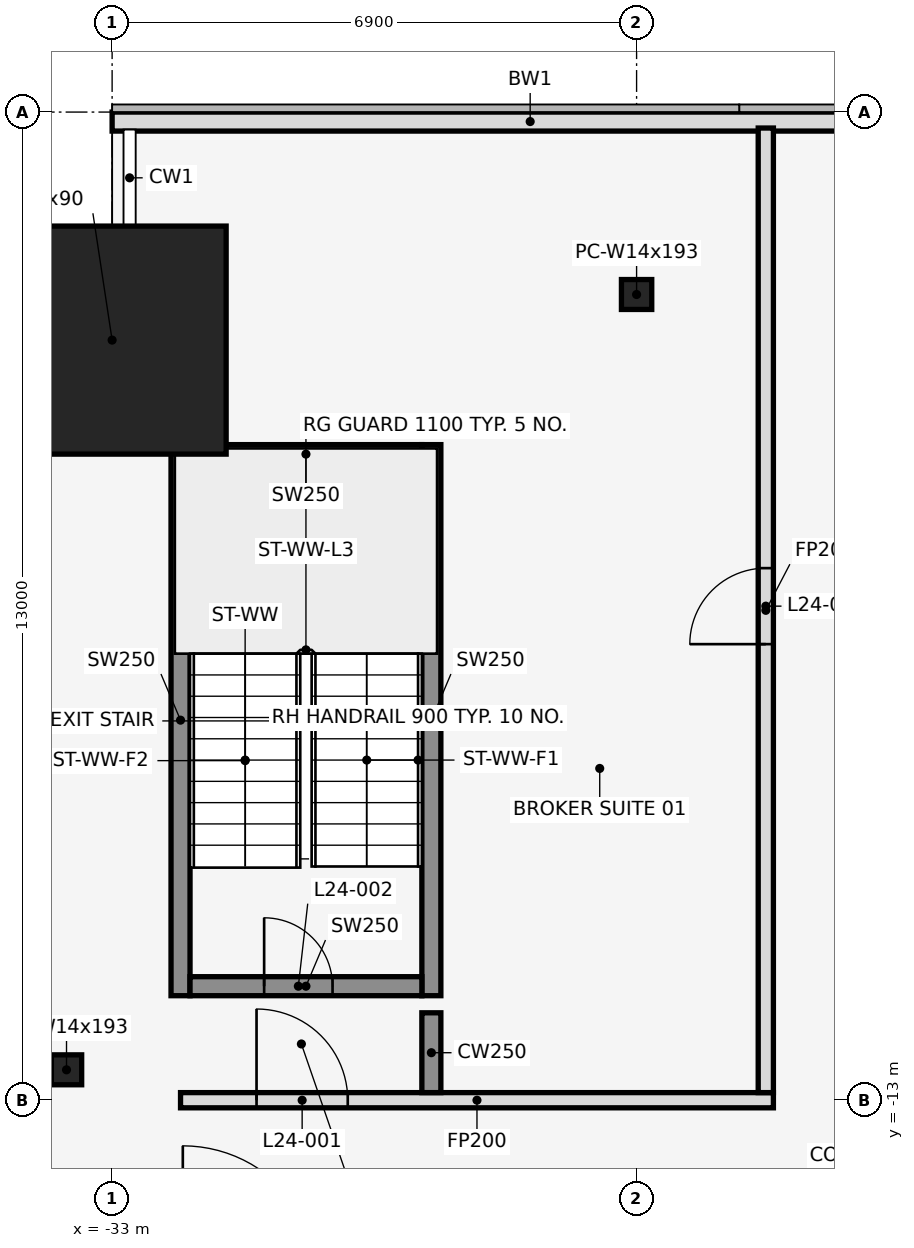
"""IFC4 building model, lengths in metres.
Left out: names, types, materials, properties, quantities, classifications, styles, units other than length and angle.
Written with IfcOpenShell. Run it as: python <this file> out.ifc"""

import sys

from ifc_helpers import new_model, si_unit, direction, frame, frame_2d, origin, origin_2d, place, context, subcontext, project, spatial, rectangle, hollow_rectangle, i_section, extrude, element, fill, save


model = new_model("IFC4")
c1 = context("Model", 3, precision=1e-05, world=origin(), true_north=direction((0.0, 1.0)))
c2 = subcontext(c1, "Body", "Model", "MODEL_VIEW")
j1 = project(units=[si_unit("LENGTHUNIT", "METRE"), si_unit("PLANEANGLEUNIT", "RADIAN")], contexts=[c1])
p1 = place(None, origin())
s1 = spatial("IfcSite", under=j1, at=p1, CompositionType="ELEMENT")
p2 = place(p1, origin())
s2 = spatial("IfcBuilding", under=s1, at=p2, CompositionType="ELEMENT")
p3 = place(p2, frame((0.0, 0.0, 114.5)))
s3 = spatial("IfcBuildingStorey", under=s2, at=p3, CompositionType="ELEMENT", Elevation=114.5)
p4 = place(p3, frame((-33.0, -3.0, 0.0), z_axis=(0.0, 0.0, 1.0), x_axis=(1.0, 0.0, 0.0)))
e1 = element("IfcColumn", 1, at=p4, inside=s3, PredefinedType="COLUMN", context=c2, shape_type="SweptSolid", body=[
    extrude(hollow_rectangle(XDim=3.0, YDim=3.0, WallThickness=0.09, at=origin_2d()), origin(), (0.0, 0.0, 1.0), 4.1),
])
for number, where, z_axis, x_axis in (
    (2, (-26.1, -2.4, 0.0), (0.0, 0.0, 1.0), (1.0, 0.0, 0.0)),
    (3, (-33.6, -12.6, 0.0), (0.0, 0.0, 1.0), (1.0, 0.0, 0.0)),
):
    element("IfcColumn", number, at=place(p3, frame(where, z_axis=z_axis, x_axis=x_axis)), inside=s3, PredefinedType="COLUMN", context=c2, shape_type="SweptSolid", body=[
        extrude(i_section(OverallWidth=0.399, OverallDepth=0.394, WebThickness=0.023, FlangeThickness=0.037, at=origin_2d()), origin(), (0.0, 0.0, 1.0), 4.1),
    ])
p5 = place(p3, frame((-22.0, -0.125, 0.0), z_axis=(0.0, 0.0, 1.0), x_axis=(-1.0, 0.0, 0.0)))
e4 = element("IfcWall", 4, at=p5, inside=s3, PredefinedType="STANDARD", context=c2, shape_type="SweptSolid", body=[
    extrude(rectangle(XDim=11.0, YDim=0.25, at=frame_2d((5.5, 0.0))), origin(), (0.0, 0.0, 1.0), 3.95),
])
for number, where, z_axis, x_axis in (
    (5, (-32.1, -11.625, 0.0), (0.0, 0.0, 1.0), (0.0, 1.0, 0.0)),
    (6, (-28.8, -11.625, 0.0), (0.0, 0.0, 1.0), (0.0, 1.0, 0.0)),
):
    element("IfcWall", number, at=place(p3, frame(where, z_axis=z_axis, x_axis=x_axis)), inside=s3, PredefinedType="SHEAR", context=c2, shape_type="SweptSolid", body=[
        extrude(rectangle(XDim=7.25, YDim=0.25, at=frame_2d((3.625, 0.0))), origin(), (0.0, 0.0, 1.0), 4.1),
    ])
p6 = place(p3, frame((-31.975, -11.5, 0.0), z_axis=(0.0, 0.0, 1.0), x_axis=(1.0, 0.0, 0.0)))
e7 = element("IfcWall", 7, at=p6, inside=s3, PredefinedType="SHEAR", context=c2, shape_type="SweptSolid", body=[
    extrude(rectangle(XDim=3.05, YDim=0.25, at=frame_2d((1.525, 0.0))), origin(), (0.0, 0.0, 1.0), 4.1),
])
p7 = place(p6, frame((0.975, 0.0, 0.0)))
e8 = element("IfcOpeningElement", 8, at=p7, cuts=e7, PredefinedType="OPENING", context=c2, shape_type="SweptSolid", body=[
    extrude(rectangle(XDim=0.9, YDim=2.1, at=frame_2d((0.45, 1.05))), frame((0.0, 0.137, 0.0), z_axis=(0.0, -1.0, 0.0), x_axis=(1.0, 0.0, 0.0)), (0.0, 0.0, 1.0), 0.274),
])
p8 = place(p3, frame((-31.975, -4.5, 0.0), z_axis=(0.0, 0.0, 1.0), x_axis=(1.0, 0.0, 0.0)))
e9 = element("IfcWall", 9, at=p8, inside=s3, PredefinedType="SHEAR", context=c2, shape_type="SweptSolid", body=[
    extrude(rectangle(XDim=3.05, YDim=0.25, at=frame_2d((1.525, 0.0))), origin(), (0.0, 0.0, 1.0), 4.1),
])
p9 = place(p3, frame((-32.1, -13.0, 0.0), z_axis=(0.0, 0.0, 1.0), x_axis=(1.0, 0.0, 0.0)))
e10 = element("IfcWall", 10, at=p9, inside=s3, PredefinedType="PARTITIONING", context=c2, shape_type="SweptSolid", body=[
    extrude(rectangle(XDim=7.8, YDim=0.2, at=frame_2d((3.9, 0.0))), origin(), (0.0, 0.0, 1.0), 3.018),
])
p10 = place(p9, frame((1.0, 0.0, 0.0)))
e11 = element("IfcOpeningElement", 11, at=p10, cuts=e10, PredefinedType="OPENING", context=c2, shape_type="SweptSolid", body=[
    extrude(rectangle(XDim=1.2, YDim=2.1, at=frame_2d((0.6, 1.05))), frame((0.0, 0.112, 0.0), z_axis=(0.0, -1.0, 0.0), x_axis=(1.0, 0.0, 0.0)), (0.0, 0.0, 1.0), 0.224),
])
p11 = place(p3, frame((-28.8, -12.9, 0.0), z_axis=(0.0, 0.0, 1.0), x_axis=(0.0, 1.0, 0.0)))
e12 = element("IfcWall", 12, at=p11, inside=s3, PredefinedType="SHEAR", context=c2, shape_type="SweptSolid", body=[
    extrude(rectangle(XDim=1.05, YDim=0.25, at=frame_2d((0.525, 0.0))), origin(), (0.0, 0.0, 1.0), 4.1),
])
p12 = place(p3, frame((-24.4, -12.9, 0.0), z_axis=(0.0, 0.0, 1.0), x_axis=(0.0, 1.0, 0.0)))
e13 = element("IfcWall", 13, at=p12, inside=s3, PredefinedType="PARTITIONING", context=c2, shape_type="SweptSolid", body=[
    extrude(rectangle(XDim=12.69, YDim=0.2, at=frame_2d((6.345, 0.0))), origin(), (0.0, 0.0, 1.0), 3.018),
])
p13 = place(p12, frame((5.9, 0.0, 0.0)))
e14 = element("IfcOpeningElement", 14, at=p13, cuts=e13, PredefinedType="OPENING", context=c2, shape_type="SweptSolid", body=[
    extrude(rectangle(XDim=1.0, YDim=2.1, at=frame_2d((0.5, 1.05))), frame((0.0, 0.112, 0.0), z_axis=(0.0, -1.0, 0.0), x_axis=(1.0, 0.0, 0.0)), (0.0, 0.0, 1.0), 0.224),
])
p14 = place(p10, origin())
e15 = element("IfcDoor", 15, at=p14, inside=s3, OperationType="SINGLE_SWING_LEFT", PredefinedType="DOOR", context=c2, shape_type="SweptSolid", body=[
    extrude(rectangle(XDim=1.2, YDim=2.1, at=frame_2d((0.6, 1.05))), frame((0.0, 0.025, 0.0), z_axis=(0.0, -1.0, 0.0), x_axis=(1.0, 0.0, 0.0)), (0.0, 0.0, 1.0), 0.05),
])
fill(e11, e15)
p15 = place(p7, origin())
e16 = element("IfcDoor", 16, at=p15, inside=s3, OperationType="SINGLE_SWING_LEFT", PredefinedType="DOOR", context=c2, shape_type="SweptSolid", body=[
    extrude(rectangle(XDim=0.9, YDim=2.1, at=frame_2d((0.45, 1.05))), frame((0.0, 0.025, 0.0), z_axis=(0.0, -1.0, 0.0), x_axis=(1.0, 0.0, 0.0)), (0.0, 0.0, 1.0), 0.05),
])
fill(e8, e16)
p16 = place(p13, origin())
e17 = element("IfcDoor", 17, at=p16, inside=s3, OperationType="SINGLE_SWING_LEFT", PredefinedType="DOOR", context=c2, shape_type="SweptSolid", body=[
    extrude(rectangle(XDim=1.0, YDim=2.1, at=frame_2d((0.5, 1.05))), frame((0.0, 0.025, 0.0), z_axis=(0.0, -1.0, 0.0), x_axis=(1.0, 0.0, 0.0)), (0.0, 0.0, 1.0), 0.05),
])
fill(e14, e17)
save(model, sys.argv[1])
